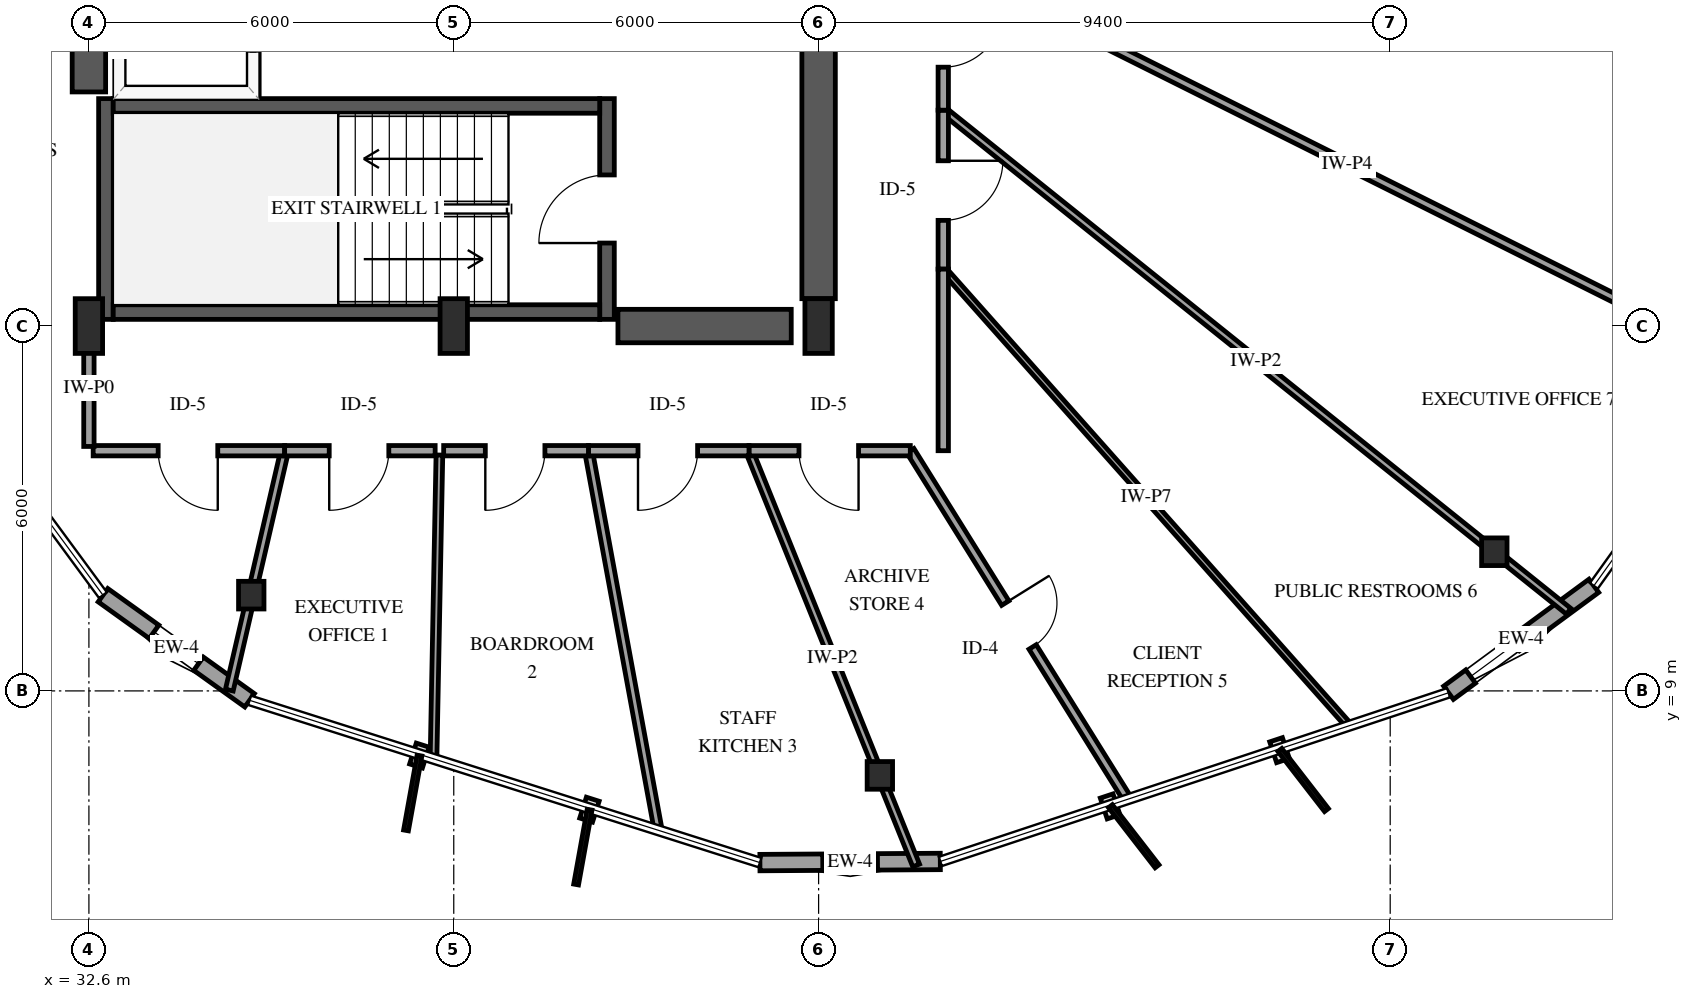
"""IFC4 building model, lengths in metres.
Left out: names, types, materials, properties, quantities, classifications, styles, units other than length and angle.
Written with IfcOpenShell. Run it as: python <this file> out.ifc"""

import sys

from ifc_helpers import new_model, si_unit, direction, frame, frame_2d, origin, origin_2d, place, context, subcontext, project, spatial, rectangle, i_section, extrude, element, fill, save


model = new_model("IFC4")
c1 = context("Model", 3, precision=1e-05, world=origin(), true_north=direction((0.0, 1.0)))
c2 = subcontext(c1, "Body", "Model", "MODEL_VIEW")
j1 = project(units=[si_unit("LENGTHUNIT", "METRE"), si_unit("PLANEANGLEUNIT", "RADIAN")], contexts=[c1])
p1 = place(None, origin())
s1 = spatial("IfcSite", under=j1, at=p1, CompositionType="ELEMENT")
p2 = place(p1, origin())
s2 = spatial("IfcBuilding", under=s1, at=p2, CompositionType="ELEMENT")
p3 = place(p2, frame((0.0, 0.0, 99.1)))
s3 = spatial("IfcBuildingStorey", under=s2, at=p3, CompositionType="ELEMENT", Elevation=99.1)
p4 = place(p3, frame((32.88, 15.11, 0.0), z_axis=(0.0, 0.0, 1.0), x_axis=(0.0, 1.0, 0.0)))
e1 = element("IfcWall", 1, at=p4, inside=s3, PredefinedType="SHEAR", context=c2, shape_type="SweptSolid", body=[
    extrude(rectangle(XDim=3.63, YDim=0.24, at=frame_2d((1.815, 0.0))), origin(), (0.0, 0.0, 1.0), 3.9),
])
p5 = place(p3, frame((41.12, 15.11, 0.0), z_axis=(0.0, 0.0, 1.0), x_axis=(0.0, 1.0, 0.0)))
e2 = element("IfcWall", 2, at=p5, inside=s3, PredefinedType="SHEAR", context=c2, shape_type="SweptSolid", body=[
    extrude(rectangle(XDim=3.63, YDim=0.24, at=frame_2d((1.815, 0.0))), origin(), (0.0, 0.0, 1.0), 3.9),
])
p6 = place(p5, frame((1.255, 0.0, 0.0)))
e3 = element("IfcOpeningElement", 3, at=p6, cuts=e2, PredefinedType="OPENING", context=c2, shape_type="SweptSolid", body=[
    extrude(rectangle(XDim=1.12, YDim=2.15, at=frame_2d((0.56, 1.075))), frame((0.0, 0.13, 0.0), z_axis=(0.0, -1.0, 0.0), x_axis=(1.0, 0.0, 0.0)), (0.0, 0.0, 1.0), 0.26),
])
for number, where, z_axis, x_axis in (
    (4, (33.0, 15.23, 0.0), (0.0, 0.0, 1.0), (1.0, 0.0, 0.0)),
    (5, (33.0, 18.62, 0.0), (0.0, 0.0, 1.0), (1.0, 0.0, 0.0)),
):
    element("IfcWall", number, at=place(p3, frame(where, z_axis=z_axis, x_axis=x_axis)), inside=s3, PredefinedType="SHEAR", context=c2, shape_type="SweptSolid", body=[
        extrude(rectangle(XDim=8.0, YDim=0.24, at=frame_2d((4.0, 0.0))), origin(), (0.0, 0.0, 1.0), 3.9),
    ])
p7 = place(p3, frame((32.6, 18.85, 0.0), z_axis=(0.0, 0.0, 1.0), x_axis=(0.0, 1.0, 0.0)))
e6 = element("IfcWall", 6, at=p7, inside=s3, PredefinedType="SHEAR", context=c2, shape_type="SweptSolid", body=[
    extrude(rectangle(XDim=12.3, YDim=0.55, at=frame_2d((6.15, 0.0))), origin(), (0.0, 0.0, 1.0), 3.9),
])
p8 = place(p3, frame((41.3, 15.0, 0.0), z_axis=(0.0, 0.0, 1.0), x_axis=(1.0, 0.0, 0.0)))
e7 = element("IfcWall", 7, at=p8, inside=s3, PredefinedType="SHEAR", context=c2, shape_type="SweptSolid", body=[
    extrude(rectangle(XDim=2.85, YDim=0.55, at=frame_2d((1.425, 0.0))), origin(), (0.0, 0.0, 1.0), 3.9),
])
p9 = place(p3, frame((44.6, 15.45, 0.0), z_axis=(0.0, 0.0, 1.0), x_axis=(0.0, 1.0, 0.0)))
e8 = element("IfcWall", 8, at=p9, inside=s3, PredefinedType="SHEAR", context=c2, shape_type="SweptSolid", body=[
    extrude(rectangle(XDim=6.35, YDim=0.55, at=frame_2d((3.175, 0.0))), origin(), (0.0, 0.0, 1.0), 3.9),
])
for number, where, z_axis, x_axis in (
    (9, (32.6, 15.0, 0.0), (0.0, 0.0, 1.0), (1.0, 0.0, 0.0)),
    (10, (38.6, 15.0, 0.0), (0.0, 0.0, 1.0), (1.0, 0.0, 0.0)),
    (11, (44.6, 15.0, 0.0), (0.0, 0.0, 1.0), (1.0, 0.0, 0.0)),
):
    element("IfcColumn", number, at=place(p3, frame(where, z_axis=z_axis, x_axis=x_axis)), inside=s3, PredefinedType="PILASTER", context=c2, shape_type="SweptSolid", body=[
        extrude(rectangle(XDim=0.45, YDim=0.9, at=origin_2d()), origin(), (0.0, 0.0, 1.0), 3.9),
    ])
for number, where, z_axis, x_axis in (
    (12, (35.27, 10.575, 0.0), (0.0, 0.0, 1.0), (1.0, 0.0, 0.0)),
    (13, (45.607, 7.611, 0.0), (0.0, 0.0, 1.0), (1.0, 0.0, 0.0)),
    (14, (55.712, 11.289, 0.0), (0.0, 0.0, 1.0), (1.0, 0.0, 0.0)),
):
    element("IfcColumn", number, at=place(p3, frame(where, z_axis=z_axis, x_axis=x_axis)), inside=s3, PredefinedType="COLUMN", context=c2, shape_type="SweptSolid", body=[
        extrude(i_section(OverallWidth=0.418, OverallDepth=0.455, WebThickness=0.042, FlangeThickness=0.068, FilletRadius=0.038, at=origin_2d()), origin(), (0.0, 0.0, 1.0), 3.9),
    ])
p10 = place(p3, frame((32.832, 10.574, 0.0), z_axis=(0.0, 0.0, 1.0), x_axis=(0.81270345811, -0.582677517308, 0.0)))
e15 = element("IfcWall", 15, at=p10, inside=s3, PredefinedType="SOLIDWALL", context=c2, shape_type="SweptSolid", body=[
    extrude(rectangle(XDim=2.967, YDim=0.27, at=frame_2d((1.483, 0.0))), origin(), (0.0, 0.0, 1.0), 2.979),
])
p11 = place(p10, frame((1.033, 0.0, 0.75)))
e16 = element("IfcOpeningElement", 16, at=p11, cuts=e15, PredefinedType="OPENING", context=c2, shape_type="SweptSolid", body=[
    extrude(rectangle(XDim=0.9, YDim=1.5, at=frame_2d((0.45, 0.75))), frame((0.0, 0.145, 0.0), z_axis=(0.0, -1.0, 0.0), x_axis=(1.0, 0.0, 0.0)), (0.0, 0.0, 1.0), 0.29),
])
p12 = place(p3, frame((43.635, 6.177, 0.0), z_axis=(0.0, 0.0, 1.0), x_axis=(0.99998044038, 0.00625450691, 0.0)))
e17 = element("IfcWall", 17, at=p12, inside=s3, PredefinedType="SOLIDWALL", context=c2, shape_type="SweptSolid", body=[
    extrude(rectangle(XDim=2.967, YDim=0.27, at=frame_2d((1.483, 0.0))), origin(), (0.0, 0.0, 1.0), 2.979),
])
p13 = place(p12, frame((1.033, 0.0, 0.75)))
e18 = element("IfcOpeningElement", 18, at=p13, cuts=e17, PredefinedType="OPENING", context=c2, shape_type="SweptSolid", body=[
    extrude(rectangle(XDim=0.9, YDim=1.5, at=frame_2d((0.45, 0.75))), frame((0.0, 0.145, 0.0), z_axis=(0.0, -1.0, 0.0), x_axis=(1.0, 0.0, 0.0)), (0.0, 0.0, 1.0), 0.29),
])
p14 = place(p3, frame((54.96, 8.969, 0.0), z_axis=(0.0, 0.0, 1.0), x_axis=(0.80529158798, 0.592878957569, 0.0)))
e19 = element("IfcWall", 19, at=p14, inside=s3, PredefinedType="SOLIDWALL", context=c2, shape_type="SweptSolid", body=[
    extrude(rectangle(XDim=2.967, YDim=0.27, at=frame_2d((1.483, 0.0))), origin(), (0.0, 0.0, 1.0), 2.979),
])
p15 = place(p14, frame((0.45, 0.0, 0.75)))
e20 = element("IfcOpeningElement", 20, at=p15, cuts=e19, PredefinedType="OPENING", context=c2, shape_type="SweptSolid", body=[
    extrude(rectangle(XDim=0.9, YDim=1.5, at=frame_2d((0.45, 0.75))), frame((0.0, 0.145, 0.0), z_axis=(0.0, -1.0, 0.0), x_axis=(1.0, 0.0, 0.0)), (0.0, 0.0, 1.0), 0.29),
])
p16 = place(p3, frame((35.3, 18.79, 0.0), z_axis=(0.0, 0.0, 1.0), x_axis=(0.0, 1.0, 0.0)))
e21 = element("IfcWall", 21, at=p16, inside=s3, PredefinedType="SOLIDWALL", context=c2, shape_type="SweptSolid", body=[
    extrude(rectangle(XDim=2.55, YDim=0.2, at=frame_2d((1.275, 0.0))), origin(), (0.0, 0.0, 1.0), 3.6),
])
p17 = place(p16, frame((0.725, 0.0, 0.0)))
e22 = element("IfcOpeningElement", 22, at=p17, cuts=e21, PredefinedType="OPENING", context=c2, shape_type="SweptSolid", body=[
    extrude(rectangle(XDim=1.1, YDim=2.15, at=frame_2d((0.55, 1.075))), frame((0.0, 0.11, 0.0), z_axis=(0.0, -1.0, 0.0), x_axis=(1.0, 0.0, 0.0)), (0.0, 0.0, 1.0), 0.22),
])
p18 = place(p3, frame((46.65, 20.975, 0.0), z_axis=(0.0, 0.0, 1.0), x_axis=(0.894492933533, -0.447082086266, 0.0)))
e23 = element("IfcWall", 23, at=p18, inside=s3, PredefinedType="PARTITIONING", context=c2, shape_type="SweptSolid", body=[
    extrude(rectangle(XDim=14.852, YDim=0.14, at=frame_2d((7.426, 0.0))), origin(), (0.0, 0.0, 1.0), 3.6),
])
p19 = place(p3, frame((46.65, 18.55, 0.0), z_axis=(0.0, 0.0, 1.0), x_axis=(0.780393276033, -0.625289000961, 0.0)))
e24 = element("IfcWall", 24, at=p19, inside=s3, PredefinedType="PARTITIONING", context=c2, shape_type="SweptSolid", body=[
    extrude(rectangle(XDim=13.179, YDim=0.12, at=frame_2d((6.59, 0.0))), origin(), (0.0, 0.0, 1.0), 2.978),
])
p20 = place(p3, frame((46.65, 15.936, 0.0), z_axis=(0.0, 0.0, 1.0), x_axis=(0.664172243605, -0.7475795816, 0.0)))
e25 = element("IfcWall", 25, at=p20, inside=s3, PredefinedType="PARTITIONING", context=c2, shape_type="SweptSolid", body=[
    extrude(rectangle(XDim=10.046, YDim=0.1, at=frame_2d((5.023, 0.0))), origin(), (0.0, 0.0, 1.0), 2.978),
])
p21 = place(p3, frame((43.455, 12.95, 0.0), z_axis=(0.0, 0.0, 1.0), x_axis=(0.373850874789, -0.927488826574, 0.0)))
e26 = element("IfcWall", 26, at=p21, inside=s3, PredefinedType="PARTITIONING", context=c2, shape_type="SweptSolid", body=[
    extrude(rectangle(XDim=7.353, YDim=0.12, at=frame_2d((3.677, 0.0))), origin(), (0.0, 0.0, 1.0), 2.895),
])
p22 = place(p3, frame((46.108, 12.95, 0.0), z_axis=(0.0, 0.0, 1.0), x_axis=(0.528926462894, -0.848667659835, 0.0)))
e27 = element("IfcWall", 27, at=p22, inside=s3, PredefinedType="PARTITIONING", context=c2, shape_type="SweptSolid", body=[
    extrude(rectangle(XDim=6.755, YDim=0.14, at=frame_2d((3.377, 0.0))), origin(), (0.0, 0.0, 1.0), 3.6),
])
p23 = place(p22, frame((2.953, 0.0, 0.0)))
e28 = element("IfcOpeningElement", 28, at=p23, cuts=e27, PredefinedType="OPENING", context=c2, shape_type="SweptSolid", body=[
    extrude(rectangle(XDim=0.85, YDim=2.1, at=frame_2d((0.425, 1.05))), frame((0.0, 0.08, 0.0), z_axis=(0.0, -1.0, 0.0), x_axis=(1.0, 0.0, 0.0)), (0.0, 0.0, 1.0), 0.16),
])
p24 = place(p3, frame((40.815, 12.95, 0.0), z_axis=(0.0, 0.0, 1.0), x_axis=(0.180754061663, -0.983528326584, 0.0)))
e29 = element("IfcWall", 29, at=p24, inside=s3, PredefinedType="PARTITIONING", context=c2, shape_type="SweptSolid", body=[
    extrude(rectangle(XDim=6.345, YDim=0.13, at=frame_2d((3.173, 0.0))), origin(), (0.0, 0.0, 1.0), 3.6),
])
p25 = place(p3, frame((32.6, 21.411, 0.0), z_axis=(0.0, 0.0, 1.0), x_axis=(-0.858222476584, -0.513277878625, 0.0)))
e30 = element("IfcWall", 30, at=p25, inside=s3, PredefinedType="PARTITIONING", context=c2, shape_type="SweptSolid", body=[
    extrude(rectangle(XDim=6.164, YDim=0.12, at=frame_2d((3.082, 0.0))), origin(), (0.0, 0.0, 1.0), 3.6),
])
p26 = place(p3, frame((38.364, 12.879, 0.0), z_axis=(0.0, 0.0, 1.0), x_axis=(-0.019401010691, -0.999811782679, 0.0)))
e31 = element("IfcWall", 31, at=p26, inside=s3, PredefinedType="PARTITIONING", context=c2, shape_type="SweptSolid", body=[
    extrude(rectangle(XDim=4.996, YDim=0.11, at=frame_2d((2.498, 0.0))), origin(), (0.0, 0.0, 1.0), 3.6),
])
p27 = place(p3, frame((35.819, 12.95, 0.0), z_axis=(0.0, 0.0, 1.0), x_axis=(-0.225238970117, -0.974303549383, 0.0)))
e32 = element("IfcWall", 32, at=p27, inside=s3, PredefinedType="PARTITIONING", context=c2, shape_type="SweptSolid", body=[
    extrude(rectangle(XDim=4.041, YDim=0.13, at=frame_2d((2.021, 0.0))), origin(), (0.0, 0.0, 1.0), 2.895),
])
p28 = place(p3, frame((35.819, 12.95, 0.0), z_axis=(0.0, 0.0, 1.0), x_axis=(-1.0, 0.0, 0.0)))
e33 = element("IfcWall", 33, at=p28, inside=s3, PredefinedType="PARTITIONING", context=c2, shape_type="SweptSolid", body=[
    extrude(rectangle(XDim=3.149, YDim=0.17, at=frame_2d((1.575, 0.0))), origin(), (0.0, 0.0, 1.0), 3.6),
])
p29 = place(p28, frame((1.1, 0.0, 0.0)))
e34 = element("IfcOpeningElement", 34, at=p29, cuts=e33, PredefinedType="OPENING", context=c2, shape_type="SweptSolid", body=[
    extrude(rectangle(XDim=0.98, YDim=2.15, at=frame_2d((0.49, 1.075))), frame((0.0, 0.095, 0.0), z_axis=(0.0, -1.0, 0.0), x_axis=(1.0, 0.0, 0.0)), (0.0, 0.0, 1.0), 0.19),
])
p30 = place(p3, frame((46.108, 12.95, 0.0), z_axis=(0.0, 0.0, 1.0), x_axis=(-1.0, 0.0, 0.0)))
e35 = element("IfcWall", 35, at=p30, inside=s3, PredefinedType="PARTITIONING", context=c2, shape_type="SweptSolid", body=[
    extrude(rectangle(XDim=2.653, YDim=0.17, at=frame_2d((1.326, 0.0))), origin(), (0.0, 0.0, 1.0), 3.6),
])
p31 = place(p30, frame((0.851, 0.0, 0.0)))
e36 = element("IfcOpeningElement", 36, at=p31, cuts=e35, PredefinedType="OPENING", context=c2, shape_type="SweptSolid", body=[
    extrude(rectangle(XDim=0.98, YDim=2.15, at=frame_2d((0.49, 1.075))), frame((0.0, 0.095, 0.0), z_axis=(0.0, -1.0, 0.0), x_axis=(1.0, 0.0, 0.0)), (0.0, 0.0, 1.0), 0.19),
])
p32 = place(p3, frame((43.455, 12.95, 0.0), z_axis=(0.0, 0.0, 1.0), x_axis=(-1.0, 0.0, 0.0)))
e37 = element("IfcWall", 37, at=p32, inside=s3, PredefinedType="PARTITIONING", context=c2, shape_type="SweptSolid", body=[
    extrude(rectangle(XDim=2.64, YDim=0.17, at=frame_2d((1.32, 0.0))), origin(), (0.0, 0.0, 1.0), 3.6),
])
p33 = place(p32, frame((0.845, 0.0, 0.0)))
e38 = element("IfcOpeningElement", 38, at=p33, cuts=e37, PredefinedType="OPENING", context=c2, shape_type="SweptSolid", body=[
    extrude(rectangle(XDim=0.98, YDim=2.15, at=frame_2d((0.49, 1.075))), frame((0.0, 0.095, 0.0), z_axis=(0.0, -1.0, 0.0), x_axis=(1.0, 0.0, 0.0)), (0.0, 0.0, 1.0), 0.19),
])
p34 = place(p3, frame((46.65, 18.55, 0.0), z_axis=(0.0, 0.0, 1.0), x_axis=(0.0, -1.0, 0.0)))
e39 = element("IfcWall", 39, at=p34, inside=s3, PredefinedType="PARTITIONING", context=c2, shape_type="SweptSolid", body=[
    extrude(rectangle(XDim=2.614, YDim=0.17, at=frame_2d((1.307, 0.0))), origin(), (0.0, 0.0, 1.0), 3.6),
])
p35 = place(p34, frame((0.832, 0.0, 0.0)))
e40 = element("IfcOpeningElement", 40, at=p35, cuts=e39, PredefinedType="OPENING", context=c2, shape_type="SweptSolid", body=[
    extrude(rectangle(XDim=0.98, YDim=2.15, at=frame_2d((0.49, 1.075))), frame((0.0, 0.095, 0.0), z_axis=(0.0, -1.0, 0.0), x_axis=(1.0, 0.0, 0.0)), (0.0, 0.0, 1.0), 0.19),
])
p36 = place(p3, frame((38.294, 12.95, 0.0), z_axis=(0.0, 0.0, 1.0), x_axis=(-1.0, 0.0, 0.0)))
e41 = element("IfcWall", 41, at=p36, inside=s3, PredefinedType="PARTITIONING", context=c2, shape_type="SweptSolid", body=[
    extrude(rectangle(XDim=2.475, YDim=0.17, at=frame_2d((1.237, 0.0))), origin(), (0.0, 0.0, 1.0), 3.6),
])
p37 = place(p36, frame((0.762, 0.0, 0.0)))
e42 = element("IfcOpeningElement", 42, at=p37, cuts=e41, PredefinedType="OPENING", context=c2, shape_type="SweptSolid", body=[
    extrude(rectangle(XDim=0.98, YDim=2.15, at=frame_2d((0.49, 1.075))), frame((0.0, 0.095, 0.0), z_axis=(0.0, -1.0, 0.0), x_axis=(1.0, 0.0, 0.0)), (0.0, 0.0, 1.0), 0.19),
])
p38 = place(p3, frame((46.65, 20.975, 0.0), z_axis=(0.0, 0.0, 1.0), x_axis=(0.0, -1.0, 0.0)))
e43 = element("IfcWall", 43, at=p38, inside=s3, PredefinedType="PARTITIONING", context=c2, shape_type="SweptSolid", body=[
    extrude(rectangle(XDim=2.425, YDim=0.17, at=frame_2d((1.212, 0.0))), origin(), (0.0, 0.0, 1.0), 3.6),
])
p39 = place(p38, frame((0.738, 0.0, 0.0)))
e44 = element("IfcOpeningElement", 44, at=p39, cuts=e43, PredefinedType="OPENING", context=c2, shape_type="SweptSolid", body=[
    extrude(rectangle(XDim=0.98, YDim=2.15, at=frame_2d((0.49, 1.075))), frame((0.0, 0.095, 0.0), z_axis=(0.0, -1.0, 0.0), x_axis=(1.0, 0.0, 0.0)), (0.0, 0.0, 1.0), 0.19),
])
p40 = place(p3, frame((40.815, 12.95, 0.0), z_axis=(0.0, 0.0, 1.0), x_axis=(-1.0, 0.0, 0.0)))
e45 = element("IfcWall", 45, at=p40, inside=s3, PredefinedType="PARTITIONING", context=c2, shape_type="SweptSolid", body=[
    extrude(rectangle(XDim=2.381, YDim=0.17, at=frame_2d((1.19, 0.0))), origin(), (0.0, 0.0, 1.0), 3.6),
])
p41 = place(p40, frame((0.716, 0.0, 0.0)))
e46 = element("IfcOpeningElement", 46, at=p41, cuts=e45, PredefinedType="OPENING", context=c2, shape_type="SweptSolid", body=[
    extrude(rectangle(XDim=0.98, YDim=2.15, at=frame_2d((0.49, 1.075))), frame((0.0, 0.095, 0.0), z_axis=(0.0, -1.0, 0.0), x_axis=(1.0, 0.0, 0.0)), (0.0, 0.0, 1.0), 0.19),
])
p42 = place(p3, frame((32.6, 13.02, 0.0), z_axis=(0.0, 0.0, 1.0), x_axis=(0.0, 1.0, 0.0)))
e47 = element("IfcWall", 47, at=p42, inside=s3, PredefinedType="PARTITIONING", context=c2, shape_type="SweptSolid", body=[
    extrude(rectangle(XDim=1.91, YDim=0.17, at=frame_2d((0.955, 0.0))), origin(), (0.0, 0.0, 1.0), 3.6),
])
p43 = place(p3, frame((46.65, 15.936, 0.0), z_axis=(0.0, 0.0, 1.0), x_axis=(0.0, -1.0, 0.0)))
e48 = element("IfcWall", 48, at=p43, inside=s3, PredefinedType="PARTITIONING", context=c2, shape_type="SweptSolid", body=[
    extrude(rectangle(XDim=2.986, YDim=0.17, at=frame_2d((1.493, 0.0))), origin(), (0.0, 0.0, 1.0), 3.6),
])
p44 = place(p11, origin())
e49 = element("IfcWindow", 49, at=p44, inside=s3, PartitioningType="SINGLE_PANEL", PredefinedType="WINDOW", context=c2, shape_type="SweptSolid", body=[
    extrude(rectangle(XDim=0.9, YDim=1.5, at=frame_2d((0.45, 0.75))), frame((0.0, 0.03, 0.0), z_axis=(0.0, -1.0, 0.0), x_axis=(1.0, 0.0, 0.0)), (0.0, 0.0, 1.0), 0.06),
])
fill(e16, e49)
p45 = place(p13, origin())
e50 = element("IfcWindow", 50, at=p45, inside=s3, PartitioningType="SINGLE_PANEL", PredefinedType="WINDOW", context=c2, shape_type="SweptSolid", body=[
    extrude(rectangle(XDim=0.9, YDim=1.5, at=frame_2d((0.45, 0.75))), frame((0.0, 0.03, 0.0), z_axis=(0.0, -1.0, 0.0), x_axis=(1.0, 0.0, 0.0)), (0.0, 0.0, 1.0), 0.06),
])
fill(e18, e50)
p46 = place(p15, origin())
e51 = element("IfcWindow", 51, at=p46, inside=s3, PartitioningType="SINGLE_PANEL", PredefinedType="WINDOW", context=c2, shape_type="SweptSolid", body=[
    extrude(rectangle(XDim=0.9, YDim=1.5, at=frame_2d((0.45, 0.75))), frame((0.0, 0.03, 0.0), z_axis=(0.0, -1.0, 0.0), x_axis=(1.0, 0.0, 0.0)), (0.0, 0.0, 1.0), 0.06),
])
fill(e20, e51)
p47 = place(p6, origin())
e52 = element("IfcDoor", 52, at=p47, inside=s3, OperationType="SINGLE_SWING_LEFT", PredefinedType="DOOR", context=c2, shape_type="SweptSolid", body=[
    extrude(rectangle(XDim=1.12, YDim=2.15, at=frame_2d((0.56, 1.075))), frame((0.0, 0.025, 0.0), z_axis=(0.0, -1.0, 0.0), x_axis=(1.0, 0.0, 0.0)), (0.0, 0.0, 1.0), 0.05),
])
fill(e3, e52)
p48 = place(p23, origin())
e53 = element("IfcDoor", 53, at=p48, inside=s3, OperationType="SINGLE_SWING_LEFT", PredefinedType="DOOR", context=c2, shape_type="SweptSolid", body=[
    extrude(rectangle(XDim=0.85, YDim=2.1, at=frame_2d((0.425, 1.05))), frame((0.0, 0.025, 0.0), z_axis=(0.0, -1.0, 0.0), x_axis=(1.0, 0.0, 0.0)), (0.0, 0.0, 1.0), 0.05),
])
fill(e28, e53)
p49 = place(p29, origin())
e54 = element("IfcDoor", 54, at=p49, inside=s3, OperationType="SINGLE_SWING_LEFT", PredefinedType="DOOR", context=c2, shape_type="SweptSolid", body=[
    extrude(rectangle(XDim=0.98, YDim=2.15, at=frame_2d((0.49, 1.075))), frame((0.0, 0.025, 0.0), z_axis=(0.0, -1.0, 0.0), x_axis=(1.0, 0.0, 0.0)), (0.0, 0.0, 1.0), 0.05),
])
fill(e34, e54)
p50 = place(p31, origin())
e55 = element("IfcDoor", 55, at=p50, inside=s3, OperationType="SINGLE_SWING_LEFT", PredefinedType="DOOR", context=c2, shape_type="SweptSolid", body=[
    extrude(rectangle(XDim=0.98, YDim=2.15, at=frame_2d((0.49, 1.075))), frame((0.0, 0.025, 0.0), z_axis=(0.0, -1.0, 0.0), x_axis=(1.0, 0.0, 0.0)), (0.0, 0.0, 1.0), 0.05),
])
fill(e36, e55)
p51 = place(p33, origin())
e56 = element("IfcDoor", 56, at=p51, inside=s3, OperationType="SINGLE_SWING_RIGHT", PredefinedType="DOOR", context=c2, shape_type="SweptSolid", body=[
    extrude(rectangle(XDim=0.98, YDim=2.15, at=frame_2d((0.49, 1.075))), frame((0.0, 0.025, 0.0), z_axis=(0.0, -1.0, 0.0), x_axis=(1.0, 0.0, 0.0)), (0.0, 0.0, 1.0), 0.05),
])
fill(e38, e56)
p52 = place(p35, origin())
e57 = element("IfcDoor", 57, at=p52, inside=s3, OperationType="SINGLE_SWING_LEFT", PredefinedType="DOOR", context=c2, shape_type="SweptSolid", body=[
    extrude(rectangle(XDim=0.98, YDim=2.15, at=frame_2d((0.49, 1.075))), frame((0.0, 0.025, 0.0), z_axis=(0.0, -1.0, 0.0), x_axis=(1.0, 0.0, 0.0)), (0.0, 0.0, 1.0), 0.05),
])
fill(e40, e57)
p53 = place(p37, origin())
e58 = element("IfcDoor", 58, at=p53, inside=s3, OperationType="SINGLE_SWING_RIGHT", PredefinedType="DOOR", context=c2, shape_type="SweptSolid", body=[
    extrude(rectangle(XDim=0.98, YDim=2.15, at=frame_2d((0.49, 1.075))), frame((0.0, 0.025, 0.0), z_axis=(0.0, -1.0, 0.0), x_axis=(1.0, 0.0, 0.0)), (0.0, 0.0, 1.0), 0.05),
])
fill(e42, e58)
p54 = place(p39, origin())
e59 = element("IfcDoor", 59, at=p54, inside=s3, OperationType="SINGLE_SWING_LEFT", PredefinedType="DOOR", context=c2, shape_type="SweptSolid", body=[
    extrude(rectangle(XDim=0.98, YDim=2.15, at=frame_2d((0.49, 1.075))), frame((0.0, 0.025, 0.0), z_axis=(0.0, -1.0, 0.0), x_axis=(1.0, 0.0, 0.0)), (0.0, 0.0, 1.0), 0.05),
])
fill(e44, e59)
p55 = place(p41, origin())
e60 = element("IfcDoor", 60, at=p55, inside=s3, OperationType="SINGLE_SWING_RIGHT", PredefinedType="DOOR", context=c2, shape_type="SweptSolid", body=[
    extrude(rectangle(XDim=0.98, YDim=2.15, at=frame_2d((0.49, 1.075))), frame((0.0, 0.025, 0.0), z_axis=(0.0, -1.0, 0.0), x_axis=(1.0, 0.0, 0.0)), (0.0, 0.0, 1.0), 0.05),
])
fill(e46, e60)
save(model, sys.argv[1])
